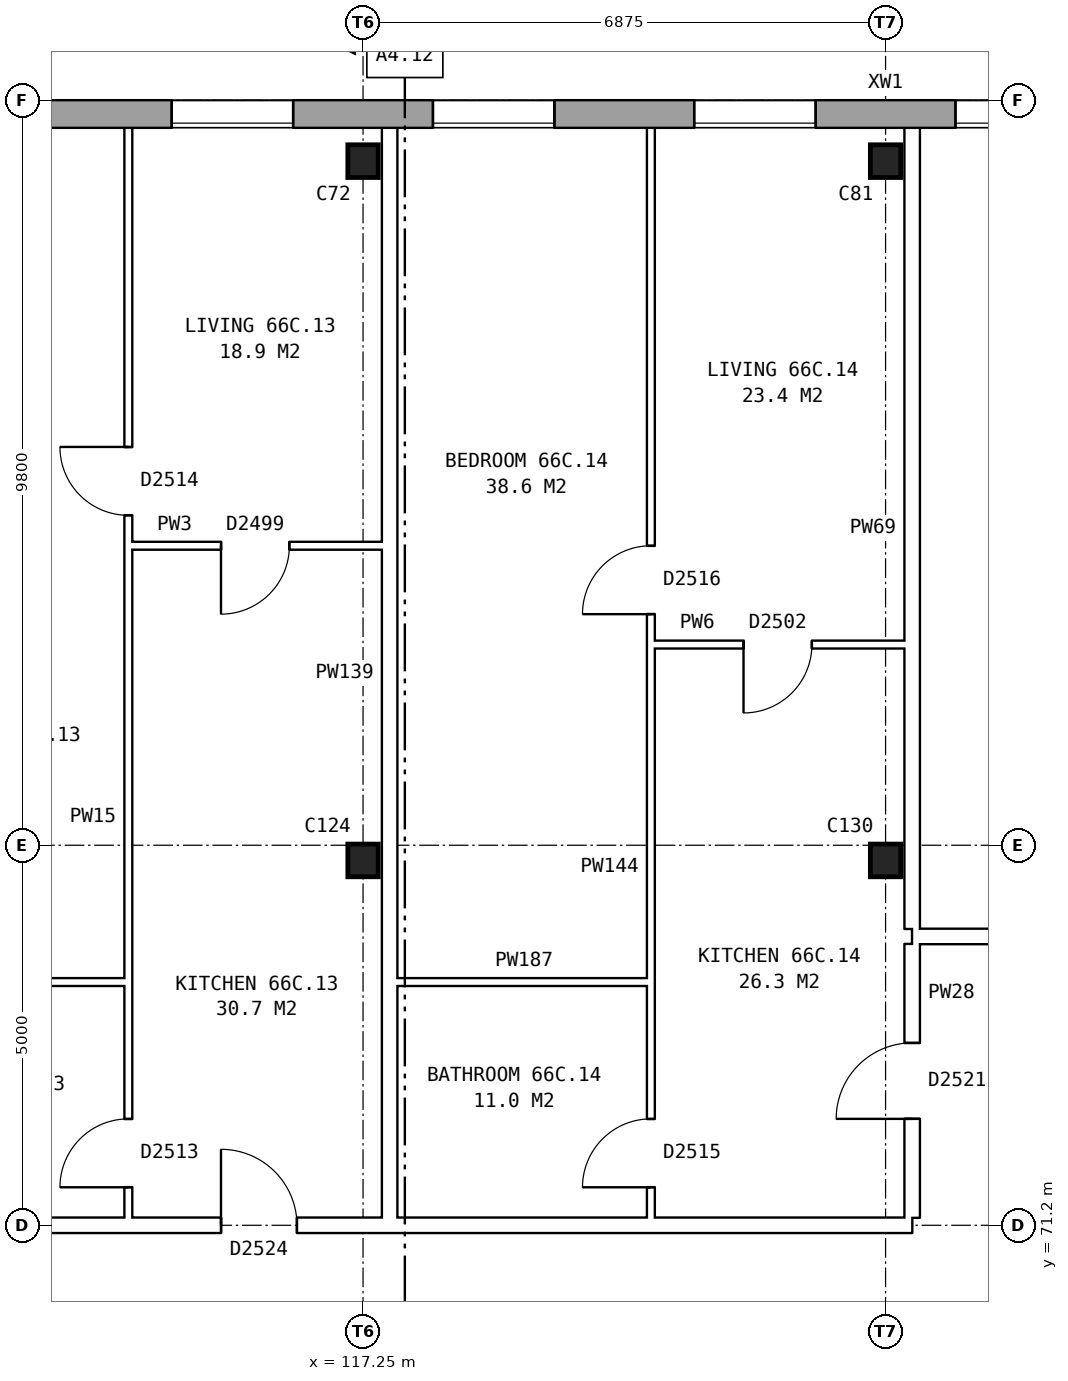
"""IFC4 building model, lengths in metres.
Left out: names, types, materials, properties, quantities, classifications, styles, units other than length and angle.
Written with IfcOpenShell. Run it as: python <this file> out.ifc"""

import sys

from ifc_helpers import new_model, si_unit, direction, frame, frame_2d, origin, origin_2d, place, context, subcontext, project, spatial, rectangle, i_section, extrude, element, fill, save


model = new_model("IFC4")
c1 = context("Model", 3, precision=1e-05, world=origin(), true_north=direction((0.0, 1.0)))
c2 = subcontext(c1, "Body", "Model", "MODEL_VIEW")
j1 = project(units=[si_unit("LENGTHUNIT", "METRE"), si_unit("PLANEANGLEUNIT", "RADIAN")], contexts=[c1])
p1 = place(None, origin())
s1 = spatial("IfcSite", under=j1, at=p1, CompositionType="ELEMENT")
p2 = place(p1, origin())
s2 = spatial("IfcBuilding", under=s1, at=p2, CompositionType="ELEMENT")
p3 = place(p2, frame((0.0, 0.0, 233.8)))
s3 = spatial("IfcBuildingStorey", under=s2, at=p3, CompositionType="ELEMENT", Elevation=233.8)
for number, where, z_axis, x_axis in (
    (1, (117.25, 76.0, 0.0), (0.0, 0.0, 1.0), (1.0, 0.0, 0.0)),
    (2, (124.125, 76.0, 0.0), (0.0, 0.0, 1.0), (1.0, 0.0, 0.0)),
    (3, (117.25, 85.2, 0.0), (0.0, 0.0, 1.0), (1.0, 0.0, 0.0)),
    (4, (124.125, 85.2, 0.0), (0.0, 0.0, 1.0), (1.0, 0.0, 0.0)),
):
    element("IfcColumn", number, at=place(p3, frame(where, z_axis=z_axis, x_axis=x_axis)), inside=s3, PredefinedType="COLUMN", context=c2, shape_type="SweptSolid", body=[
        extrude(i_section(OverallWidth=0.4, OverallDepth=0.43, WebThickness=0.028, FlangeThickness=0.04, at=origin_2d()), origin(), (0.0, 0.0, 1.0), 2.85),
    ])
p4 = place(p3, frame((131.05, 85.82, 0.0), z_axis=(0.0, 0.0, 1.0), x_axis=(-1.0, 0.0, 0.0)))
e5 = element("IfcWall", 5, at=p4, inside=s3, PredefinedType="STANDARD", context=c2, shape_type="SweptSolid", body=[
    extrude(rectangle(XDim=55.1, YDim=0.36, at=frame_2d((27.55, 0.0))), origin(), (0.0, 0.0, 1.0), 2.85),
])
p5 = place(p4, frame((0.969, 0.0, 0.8)))
e6 = element("IfcOpeningElement", 6, at=p5, cuts=e5, PredefinedType="OPENING", context=c2, shape_type="SweptSolid", body=[
    extrude(rectangle(XDim=1.6, YDim=1.8, at=frame_2d((0.8, 0.9))), frame((0.0, 0.19, 0.0), z_axis=(0.0, -1.0, 0.0), x_axis=(1.0, 0.0, 0.0)), (0.0, 0.0, 1.0), 0.38),
])
p6 = place(p4, frame((4.406, 0.0, 0.8)))
e7 = element("IfcOpeningElement", 7, at=p6, cuts=e5, PredefinedType="OPENING", context=c2, shape_type="SweptSolid", body=[
    extrude(rectangle(XDim=1.6, YDim=1.8, at=frame_2d((0.8, 0.9))), frame((0.0, 0.19, 0.0), z_axis=(0.0, -1.0, 0.0), x_axis=(1.0, 0.0, 0.0)), (0.0, 0.0, 1.0), 0.38),
])
p7 = place(p4, frame((7.844, 0.0, 0.8)))
e8 = element("IfcOpeningElement", 8, at=p7, cuts=e5, PredefinedType="OPENING", context=c2, shape_type="SweptSolid", body=[
    extrude(rectangle(XDim=1.6, YDim=1.8, at=frame_2d((0.8, 0.9))), frame((0.0, 0.19, 0.0), z_axis=(0.0, -1.0, 0.0), x_axis=(1.0, 0.0, 0.0)), (0.0, 0.0, 1.0), 0.38),
])
p8 = place(p4, frame((11.281, 0.0, 0.8)))
e9 = element("IfcOpeningElement", 9, at=p8, cuts=e5, PredefinedType="OPENING", context=c2, shape_type="SweptSolid", body=[
    extrude(rectangle(XDim=1.6, YDim=1.8, at=frame_2d((0.8, 0.9))), frame((0.0, 0.19, 0.0), z_axis=(0.0, -1.0, 0.0), x_axis=(1.0, 0.0, 0.0)), (0.0, 0.0, 1.0), 0.38),
])
p9 = place(p4, frame((14.719, 0.0, 0.8)))
e10 = element("IfcOpeningElement", 10, at=p9, cuts=e5, PredefinedType="OPENING", context=c2, shape_type="SweptSolid", body=[
    extrude(rectangle(XDim=1.6, YDim=1.8, at=frame_2d((0.8, 0.9))), frame((0.0, 0.19, 0.0), z_axis=(0.0, -1.0, 0.0), x_axis=(1.0, 0.0, 0.0)), (0.0, 0.0, 1.0), 0.38),
])
p10 = place(p4, frame((18.156, 0.0, 0.8)))
e11 = element("IfcOpeningElement", 11, at=p10, cuts=e5, PredefinedType="OPENING", context=c2, shape_type="SweptSolid", body=[
    extrude(rectangle(XDim=1.6, YDim=1.8, at=frame_2d((0.8, 0.9))), frame((0.0, 0.19, 0.0), z_axis=(0.0, -1.0, 0.0), x_axis=(1.0, 0.0, 0.0)), (0.0, 0.0, 1.0), 0.38),
])
p11 = place(p4, frame((21.594, 0.0, 0.8)))
e12 = element("IfcOpeningElement", 12, at=p11, cuts=e5, PredefinedType="OPENING", context=c2, shape_type="SweptSolid", body=[
    extrude(rectangle(XDim=1.6, YDim=1.8, at=frame_2d((0.8, 0.9))), frame((0.0, 0.19, 0.0), z_axis=(0.0, -1.0, 0.0), x_axis=(1.0, 0.0, 0.0)), (0.0, 0.0, 1.0), 0.38),
])
p12 = place(p4, frame((25.031, 0.0, 0.8)))
e13 = element("IfcOpeningElement", 13, at=p12, cuts=e5, PredefinedType="OPENING", context=c2, shape_type="SweptSolid", body=[
    extrude(rectangle(XDim=1.6, YDim=1.8, at=frame_2d((0.8, 0.9))), frame((0.0, 0.19, 0.0), z_axis=(0.0, -1.0, 0.0), x_axis=(1.0, 0.0, 0.0)), (0.0, 0.0, 1.0), 0.38),
])
p13 = place(p4, frame((28.469, 0.0, 0.8)))
e14 = element("IfcOpeningElement", 14, at=p13, cuts=e5, PredefinedType="OPENING", context=c2, shape_type="SweptSolid", body=[
    extrude(rectangle(XDim=1.6, YDim=1.8, at=frame_2d((0.8, 0.9))), frame((0.0, 0.19, 0.0), z_axis=(0.0, -1.0, 0.0), x_axis=(1.0, 0.0, 0.0)), (0.0, 0.0, 1.0), 0.38),
])
p14 = place(p4, frame((31.906, 0.0, 0.8)))
e15 = element("IfcOpeningElement", 15, at=p14, cuts=e5, PredefinedType="OPENING", context=c2, shape_type="SweptSolid", body=[
    extrude(rectangle(XDim=1.6, YDim=1.8, at=frame_2d((0.8, 0.9))), frame((0.0, 0.19, 0.0), z_axis=(0.0, -1.0, 0.0), x_axis=(1.0, 0.0, 0.0)), (0.0, 0.0, 1.0), 0.38),
])
p15 = place(p4, frame((35.344, 0.0, 0.8)))
e16 = element("IfcOpeningElement", 16, at=p15, cuts=e5, PredefinedType="OPENING", context=c2, shape_type="SweptSolid", body=[
    extrude(rectangle(XDim=1.6, YDim=1.8, at=frame_2d((0.8, 0.9))), frame((0.0, 0.19, 0.0), z_axis=(0.0, -1.0, 0.0), x_axis=(1.0, 0.0, 0.0)), (0.0, 0.0, 1.0), 0.38),
])
p16 = place(p4, frame((38.781, 0.0, 0.8)))
e17 = element("IfcOpeningElement", 17, at=p16, cuts=e5, PredefinedType="OPENING", context=c2, shape_type="SweptSolid", body=[
    extrude(rectangle(XDim=1.6, YDim=1.8, at=frame_2d((0.8, 0.9))), frame((0.0, 0.19, 0.0), z_axis=(0.0, -1.0, 0.0), x_axis=(1.0, 0.0, 0.0)), (0.0, 0.0, 1.0), 0.38),
])
p17 = place(p4, frame((42.219, 0.0, 0.8)))
e18 = element("IfcOpeningElement", 18, at=p17, cuts=e5, PredefinedType="OPENING", context=c2, shape_type="SweptSolid", body=[
    extrude(rectangle(XDim=1.6, YDim=1.8, at=frame_2d((0.8, 0.9))), frame((0.0, 0.19, 0.0), z_axis=(0.0, -1.0, 0.0), x_axis=(1.0, 0.0, 0.0)), (0.0, 0.0, 1.0), 0.38),
])
p18 = place(p4, frame((45.656, 0.0, 0.8)))
e19 = element("IfcOpeningElement", 19, at=p18, cuts=e5, PredefinedType="OPENING", context=c2, shape_type="SweptSolid", body=[
    extrude(rectangle(XDim=1.6, YDim=1.8, at=frame_2d((0.8, 0.9))), frame((0.0, 0.19, 0.0), z_axis=(0.0, -1.0, 0.0), x_axis=(1.0, 0.0, 0.0)), (0.0, 0.0, 1.0), 0.38),
])
p19 = place(p4, frame((49.094, 0.0, 0.8)))
e20 = element("IfcOpeningElement", 20, at=p19, cuts=e5, PredefinedType="OPENING", context=c2, shape_type="SweptSolid", body=[
    extrude(rectangle(XDim=1.6, YDim=1.8, at=frame_2d((0.8, 0.9))), frame((0.0, 0.19, 0.0), z_axis=(0.0, -1.0, 0.0), x_axis=(1.0, 0.0, 0.0)), (0.0, 0.0, 1.0), 0.38),
])
p20 = place(p4, frame((52.531, 0.0, 0.8)))
e21 = element("IfcOpeningElement", 21, at=p20, cuts=e5, PredefinedType="OPENING", context=c2, shape_type="SweptSolid", body=[
    extrude(rectangle(XDim=1.6, YDim=1.8, at=frame_2d((0.8, 0.9))), frame((0.0, 0.19, 0.0), z_axis=(0.0, -1.0, 0.0), x_axis=(1.0, 0.0, 0.0)), (0.0, 0.0, 1.0), 0.38),
])
p21 = place(p3, frame((83.225, 71.2, 0.0), z_axis=(0.0, 0.0, 1.0), x_axis=(1.0, 0.0, 0.0)))
e22 = element("IfcWall", 22, at=p21, inside=s3, PredefinedType="PARTITIONING", context=c2, shape_type="SweptSolid", body=[
    extrude(rectangle(XDim=41.25, YDim=0.2, at=frame_2d((20.625, 0.0))), origin(), (0.0, 0.0, 1.0), 2.85),
])
p22 = place(p21, frame((11.531, 0.0, 0.0)))
e23 = element("IfcOpeningElement", 23, at=p22, cuts=e22, PredefinedType="OPENING", context=c2, shape_type="SweptSolid", body=[
    extrude(rectangle(XDim=1.0, YDim=2.1, at=frame_2d((0.5, 1.05))), frame((0.0, 0.11, 0.0), z_axis=(0.0, -1.0, 0.0), x_axis=(1.0, 0.0, 0.0)), (0.0, 0.0, 1.0), 0.22),
])
p23 = place(p21, frame((21.844, 0.0, 0.0)))
e24 = element("IfcOpeningElement", 24, at=p23, cuts=e22, PredefinedType="OPENING", context=c2, shape_type="SweptSolid", body=[
    extrude(rectangle(XDim=1.0, YDim=2.1, at=frame_2d((0.5, 1.05))), frame((0.0, 0.11, 0.0), z_axis=(0.0, -1.0, 0.0), x_axis=(1.0, 0.0, 0.0)), (0.0, 0.0, 1.0), 0.22),
])
p24 = place(p21, frame((32.156, 0.0, 0.0)))
e25 = element("IfcOpeningElement", 25, at=p24, cuts=e22, PredefinedType="OPENING", context=c2, shape_type="SweptSolid", body=[
    extrude(rectangle(XDim=1.0, YDim=2.1, at=frame_2d((0.5, 1.05))), frame((0.0, 0.11, 0.0), z_axis=(0.0, -1.0, 0.0), x_axis=(1.0, 0.0, 0.0)), (0.0, 0.0, 1.0), 0.22),
])
p25 = place(p3, frame((107.287, 74.4, 0.0), z_axis=(0.0, 0.0, 1.0), x_axis=(1.0, 0.0, 0.0)))
e26 = element("IfcWall", 26, at=p25, inside=s3, PredefinedType="PARTITIONING", context=c2, shape_type="SweptSolid", body=[
    extrude(rectangle(XDim=6.875, YDim=0.1, at=frame_2d((3.438, 0.0))), origin(), (0.0, 0.0, 1.0), 2.85),
])
p26 = place(p3, frame((117.7, 74.4, 0.0), z_axis=(0.0, 0.0, 1.0), x_axis=(1.0, 0.0, 0.0)))
e27 = element("IfcWall", 27, at=p26, inside=s3, PredefinedType="PARTITIONING", context=c2, shape_type="SweptSolid", body=[
    extrude(rectangle(XDim=3.337, YDim=0.1, at=frame_2d((1.668, 0.0))), origin(), (0.0, 0.0, 1.0), 2.85),
])
p27 = place(p3, frame((124.475, 75.0, 0.0), z_axis=(0.0, 0.0, 1.0), x_axis=(1.0, 0.0, 0.0)))
e28 = element("IfcWall", 28, at=p27, inside=s3, PredefinedType="PARTITIONING", context=c2, shape_type="SweptSolid", body=[
    extrude(rectangle(XDim=6.885, YDim=0.2, at=frame_2d((3.442, 0.0))), origin(), (0.0, 0.0, 1.0), 2.85),
])
p28 = place(p27, frame((2.992, 0.0, 0.0)))
e29 = element("IfcOpeningElement", 29, at=p28, cuts=e28, PredefinedType="OPENING", context=c2, shape_type="SweptSolid", body=[
    extrude(rectangle(XDim=0.9, YDim=2.1, at=frame_2d((0.45, 1.05))), frame((0.0, 0.11, 0.0), z_axis=(0.0, -1.0, 0.0), x_axis=(1.0, 0.0, 0.0)), (0.0, 0.0, 1.0), 0.22),
])
p29 = place(p3, frame((121.037, 78.84, 0.0), z_axis=(0.0, 0.0, 1.0), x_axis=(1.0, 0.0, 0.0)))
e30 = element("IfcWall", 30, at=p29, inside=s3, PredefinedType="PARTITIONING", context=c2, shape_type="SweptSolid", body=[
    extrude(rectangle(XDim=3.338, YDim=0.1, at=frame_2d((1.669, 0.0))), origin(), (0.0, 0.0, 1.0), 2.85),
])
p30 = place(p29, frame((1.219, 0.0, 0.0)))
e31 = element("IfcOpeningElement", 31, at=p30, cuts=e30, PredefinedType="OPENING", context=c2, shape_type="SweptSolid", body=[
    extrude(rectangle(XDim=0.9, YDim=2.1, at=frame_2d((0.45, 1.05))), frame((0.0, 0.06, 0.0), z_axis=(0.0, -1.0, 0.0), x_axis=(1.0, 0.0, 0.0)), (0.0, 0.0, 1.0), 0.12),
])
p31 = place(p3, frame((114.162, 80.14, 0.0), z_axis=(0.0, 0.0, 1.0), x_axis=(1.0, 0.0, 0.0)))
e32 = element("IfcWall", 32, at=p31, inside=s3, PredefinedType="PARTITIONING", context=c2, shape_type="SweptSolid", body=[
    extrude(rectangle(XDim=3.338, YDim=0.1, at=frame_2d((1.669, 0.0))), origin(), (0.0, 0.0, 1.0), 2.85),
])
p32 = place(p31, frame((1.219, 0.0, 0.0)))
e33 = element("IfcOpeningElement", 33, at=p32, cuts=e32, PredefinedType="OPENING", context=c2, shape_type="SweptSolid", body=[
    extrude(rectangle(XDim=0.9, YDim=2.1, at=frame_2d((0.45, 1.05))), frame((0.0, 0.06, 0.0), z_axis=(0.0, -1.0, 0.0), x_axis=(1.0, 0.0, 0.0)), (0.0, 0.0, 1.0), 0.12),
])
p33 = place(p3, frame((114.162, 71.3, 0.0), z_axis=(0.0, 0.0, 1.0), x_axis=(0.0, 1.0, 0.0)))
e34 = element("IfcWall", 34, at=p33, inside=s3, PredefinedType="PARTITIONING", context=c2, shape_type="SweptSolid", body=[
    extrude(rectangle(XDim=14.34, YDim=0.1, at=frame_2d((7.17, 0.0))), origin(), (0.0, 0.0, 1.0), 2.85),
])
p34 = place(p33, frame((9.24, 0.0, 0.0)))
e35 = element("IfcOpeningElement", 35, at=p34, cuts=e34, PredefinedType="OPENING", context=c2, shape_type="SweptSolid", body=[
    extrude(rectangle(XDim=0.9, YDim=2.1, at=frame_2d((0.45, 1.05))), frame((0.0, 0.06, 0.0), z_axis=(0.0, -1.0, 0.0), x_axis=(1.0, 0.0, 0.0)), (0.0, 0.0, 1.0), 0.12),
])
p35 = place(p33, frame((0.4, 0.0, 0.0)))
e36 = element("IfcOpeningElement", 36, at=p35, cuts=e34, PredefinedType="OPENING", context=c2, shape_type="SweptSolid", body=[
    extrude(rectangle(XDim=0.9, YDim=2.1, at=frame_2d((0.45, 1.05))), frame((0.0, 0.06, 0.0), z_axis=(0.0, -1.0, 0.0), x_axis=(1.0, 0.0, 0.0)), (0.0, 0.0, 1.0), 0.12),
])
p36 = place(p3, frame((117.6, 71.3, 0.0), z_axis=(0.0, 0.0, 1.0), x_axis=(0.0, 1.0, 0.0)))
e37 = element("IfcWall", 37, at=p36, inside=s3, PredefinedType="PARTITIONING", context=c2, shape_type="SweptSolid", body=[
    extrude(rectangle(XDim=14.34, YDim=0.2, at=frame_2d((7.17, 0.0))), origin(), (0.0, 0.0, 1.0), 2.85),
])
p37 = place(p3, frame((121.037, 71.3, 0.0), z_axis=(0.0, 0.0, 1.0), x_axis=(0.0, 1.0, 0.0)))
e38 = element("IfcWall", 38, at=p37, inside=s3, PredefinedType="PARTITIONING", context=c2, shape_type="SweptSolid", body=[
    extrude(rectangle(XDim=14.34, YDim=0.1, at=frame_2d((7.17, 0.0))), origin(), (0.0, 0.0, 1.0), 2.85),
])
p38 = place(p37, frame((7.94, 0.0, 0.0)))
e39 = element("IfcOpeningElement", 39, at=p38, cuts=e38, PredefinedType="OPENING", context=c2, shape_type="SweptSolid", body=[
    extrude(rectangle(XDim=0.9, YDim=2.1, at=frame_2d((0.45, 1.05))), frame((0.0, 0.06, 0.0), z_axis=(0.0, -1.0, 0.0), x_axis=(1.0, 0.0, 0.0)), (0.0, 0.0, 1.0), 0.12),
])
p39 = place(p37, frame((0.4, 0.0, 0.0)))
e40 = element("IfcOpeningElement", 40, at=p39, cuts=e38, PredefinedType="OPENING", context=c2, shape_type="SweptSolid", body=[
    extrude(rectangle(XDim=0.9, YDim=2.1, at=frame_2d((0.45, 1.05))), frame((0.0, 0.06, 0.0), z_axis=(0.0, -1.0, 0.0), x_axis=(1.0, 0.0, 0.0)), (0.0, 0.0, 1.0), 0.12),
])
p40 = place(p3, frame((124.475, 71.3, 0.0), z_axis=(0.0, 0.0, 1.0), x_axis=(0.0, 1.0, 0.0)))
e41 = element("IfcWall", 41, at=p40, inside=s3, PredefinedType="PARTITIONING", context=c2, shape_type="SweptSolid", body=[
    extrude(rectangle(XDim=3.6, YDim=0.2, at=frame_2d((1.8, 0.0))), origin(), (0.0, 0.0, 1.0), 2.85),
])
p41 = place(p40, frame((1.3, 0.0, 0.0)))
e42 = element("IfcOpeningElement", 42, at=p41, cuts=e41, PredefinedType="OPENING", context=c2, shape_type="SweptSolid", body=[
    extrude(rectangle(XDim=1.0, YDim=2.1, at=frame_2d((0.5, 1.05))), frame((0.0, 0.11, 0.0), z_axis=(0.0, -1.0, 0.0), x_axis=(1.0, 0.0, 0.0)), (0.0, 0.0, 1.0), 0.22),
])
p42 = place(p3, frame((124.475, 75.1, 0.0), z_axis=(0.0, 0.0, 1.0), x_axis=(0.0, 1.0, 0.0)))
e43 = element("IfcWall", 43, at=p42, inside=s3, PredefinedType="PARTITIONING", context=c2, shape_type="SweptSolid", body=[
    extrude(rectangle(XDim=10.54, YDim=0.2, at=frame_2d((5.27, 0.0))), origin(), (0.0, 0.0, 1.0), 2.85),
])
p43 = place(p6, origin())
e44 = element("IfcWindow", 44, at=p43, inside=s3, PartitioningType="SINGLE_PANEL", PredefinedType="WINDOW", context=c2, shape_type="SweptSolid", body=[
    extrude(rectangle(XDim=1.6, YDim=1.8, at=frame_2d((0.8, 0.9))), frame((0.0, 0.15, 0.0), z_axis=(0.0, -1.0, 0.0), x_axis=(1.0, 0.0, 0.0)), (0.0, 0.0, 1.0), 0.06),
])
fill(e7, e44)
p44 = place(p7, origin())
e45 = element("IfcWindow", 45, at=p44, inside=s3, PartitioningType="SINGLE_PANEL", PredefinedType="WINDOW", context=c2, shape_type="SweptSolid", body=[
    extrude(rectangle(XDim=1.6, YDim=1.8, at=frame_2d((0.8, 0.9))), frame((0.0, 0.15, 0.0), z_axis=(0.0, -1.0, 0.0), x_axis=(1.0, 0.0, 0.0)), (0.0, 0.0, 1.0), 0.06),
])
fill(e8, e45)
p45 = place(p8, origin())
e46 = element("IfcWindow", 46, at=p45, inside=s3, PartitioningType="SINGLE_PANEL", PredefinedType="WINDOW", context=c2, shape_type="SweptSolid", body=[
    extrude(rectangle(XDim=1.6, YDim=1.8, at=frame_2d((0.8, 0.9))), frame((0.0, 0.15, 0.0), z_axis=(0.0, -1.0, 0.0), x_axis=(1.0, 0.0, 0.0)), (0.0, 0.0, 1.0), 0.06),
])
fill(e9, e46)
p46 = place(p9, origin())
e47 = element("IfcWindow", 47, at=p46, inside=s3, PartitioningType="SINGLE_PANEL", PredefinedType="WINDOW", context=c2, shape_type="SweptSolid", body=[
    extrude(rectangle(XDim=1.6, YDim=1.8, at=frame_2d((0.8, 0.9))), frame((0.0, 0.15, 0.0), z_axis=(0.0, -1.0, 0.0), x_axis=(1.0, 0.0, 0.0)), (0.0, 0.0, 1.0), 0.06),
])
fill(e10, e47)
p47 = place(p34, origin())
e48 = element("IfcDoor", 48, at=p47, inside=s3, OperationType="SINGLE_SWING_RIGHT", PredefinedType="DOOR", context=c2, shape_type="SweptSolid", body=[
    extrude(rectangle(XDim=0.9, YDim=2.1, at=frame_2d((0.45, 1.05))), frame((0.0, 0.025, 0.0), z_axis=(0.0, -1.0, 0.0), x_axis=(1.0, 0.0, 0.0)), (0.0, 0.0, 1.0), 0.05),
])
fill(e35, e48)
p48 = place(p24, origin())
e49 = element("IfcDoor", 49, at=p48, inside=s3, OperationType="SINGLE_SWING_LEFT", PredefinedType="DOOR", context=c2, shape_type="SweptSolid", body=[
    extrude(rectangle(XDim=1.0, YDim=2.1, at=frame_2d((0.5, 1.05))), frame((0.0, 0.025, 0.0), z_axis=(0.0, -1.0, 0.0), x_axis=(1.0, 0.0, 0.0)), (0.0, 0.0, 1.0), 0.05),
])
fill(e25, e49)
p49 = place(p32, frame((0.9, 0.0, 0.0), z_axis=(0.0, 0.0, 1.0), x_axis=(-1.0, 0.0, 0.0)))
e50 = element("IfcDoor", 50, at=p49, inside=s3, OperationType="SINGLE_SWING_RIGHT", PredefinedType="DOOR", context=c2, shape_type="SweptSolid", body=[
    extrude(rectangle(XDim=0.9, YDim=2.1, at=frame_2d((0.45, 1.05))), frame((0.0, 0.025, 0.0), z_axis=(0.0, -1.0, 0.0), x_axis=(1.0, 0.0, 0.0)), (0.0, 0.0, 1.0), 0.05),
])
fill(e33, e50)
p50 = place(p35, origin())
e51 = element("IfcDoor", 51, at=p50, inside=s3, OperationType="SINGLE_SWING_LEFT", PredefinedType="DOOR", context=c2, shape_type="SweptSolid", body=[
    extrude(rectangle(XDim=0.9, YDim=2.1, at=frame_2d((0.45, 1.05))), frame((0.0, 0.025, 0.0), z_axis=(0.0, -1.0, 0.0), x_axis=(1.0, 0.0, 0.0)), (0.0, 0.0, 1.0), 0.05),
])
fill(e36, e51)
p51 = place(p38, origin())
e52 = element("IfcDoor", 52, at=p51, inside=s3, OperationType="SINGLE_SWING_LEFT", PredefinedType="DOOR", context=c2, shape_type="SweptSolid", body=[
    extrude(rectangle(XDim=0.9, YDim=2.1, at=frame_2d((0.45, 1.05))), frame((0.0, 0.025, 0.0), z_axis=(0.0, -1.0, 0.0), x_axis=(1.0, 0.0, 0.0)), (0.0, 0.0, 1.0), 0.05),
])
fill(e39, e52)
p52 = place(p41, origin())
e53 = element("IfcDoor", 53, at=p52, inside=s3, OperationType="SINGLE_SWING_LEFT", PredefinedType="DOOR", context=c2, shape_type="SweptSolid", body=[
    extrude(rectangle(XDim=1.0, YDim=2.1, at=frame_2d((0.5, 1.05))), frame((0.0, 0.025, 0.0), z_axis=(0.0, -1.0, 0.0), x_axis=(1.0, 0.0, 0.0)), (0.0, 0.0, 1.0), 0.05),
])
fill(e42, e53)
p53 = place(p30, frame((0.9, 0.0, 0.0), z_axis=(0.0, 0.0, 1.0), x_axis=(-1.0, 0.0, 0.0)))
e54 = element("IfcDoor", 54, at=p53, inside=s3, OperationType="SINGLE_SWING_RIGHT", PredefinedType="DOOR", context=c2, shape_type="SweptSolid", body=[
    extrude(rectangle(XDim=0.9, YDim=2.1, at=frame_2d((0.45, 1.05))), frame((0.0, 0.025, 0.0), z_axis=(0.0, -1.0, 0.0), x_axis=(1.0, 0.0, 0.0)), (0.0, 0.0, 1.0), 0.05),
])
fill(e31, e54)
p54 = place(p39, origin())
e55 = element("IfcDoor", 55, at=p54, inside=s3, OperationType="SINGLE_SWING_LEFT", PredefinedType="DOOR", context=c2, shape_type="SweptSolid", body=[
    extrude(rectangle(XDim=0.9, YDim=2.1, at=frame_2d((0.45, 1.05))), frame((0.0, 0.025, 0.0), z_axis=(0.0, -1.0, 0.0), x_axis=(1.0, 0.0, 0.0)), (0.0, 0.0, 1.0), 0.05),
])
fill(e40, e55)
save(model, sys.argv[1])
